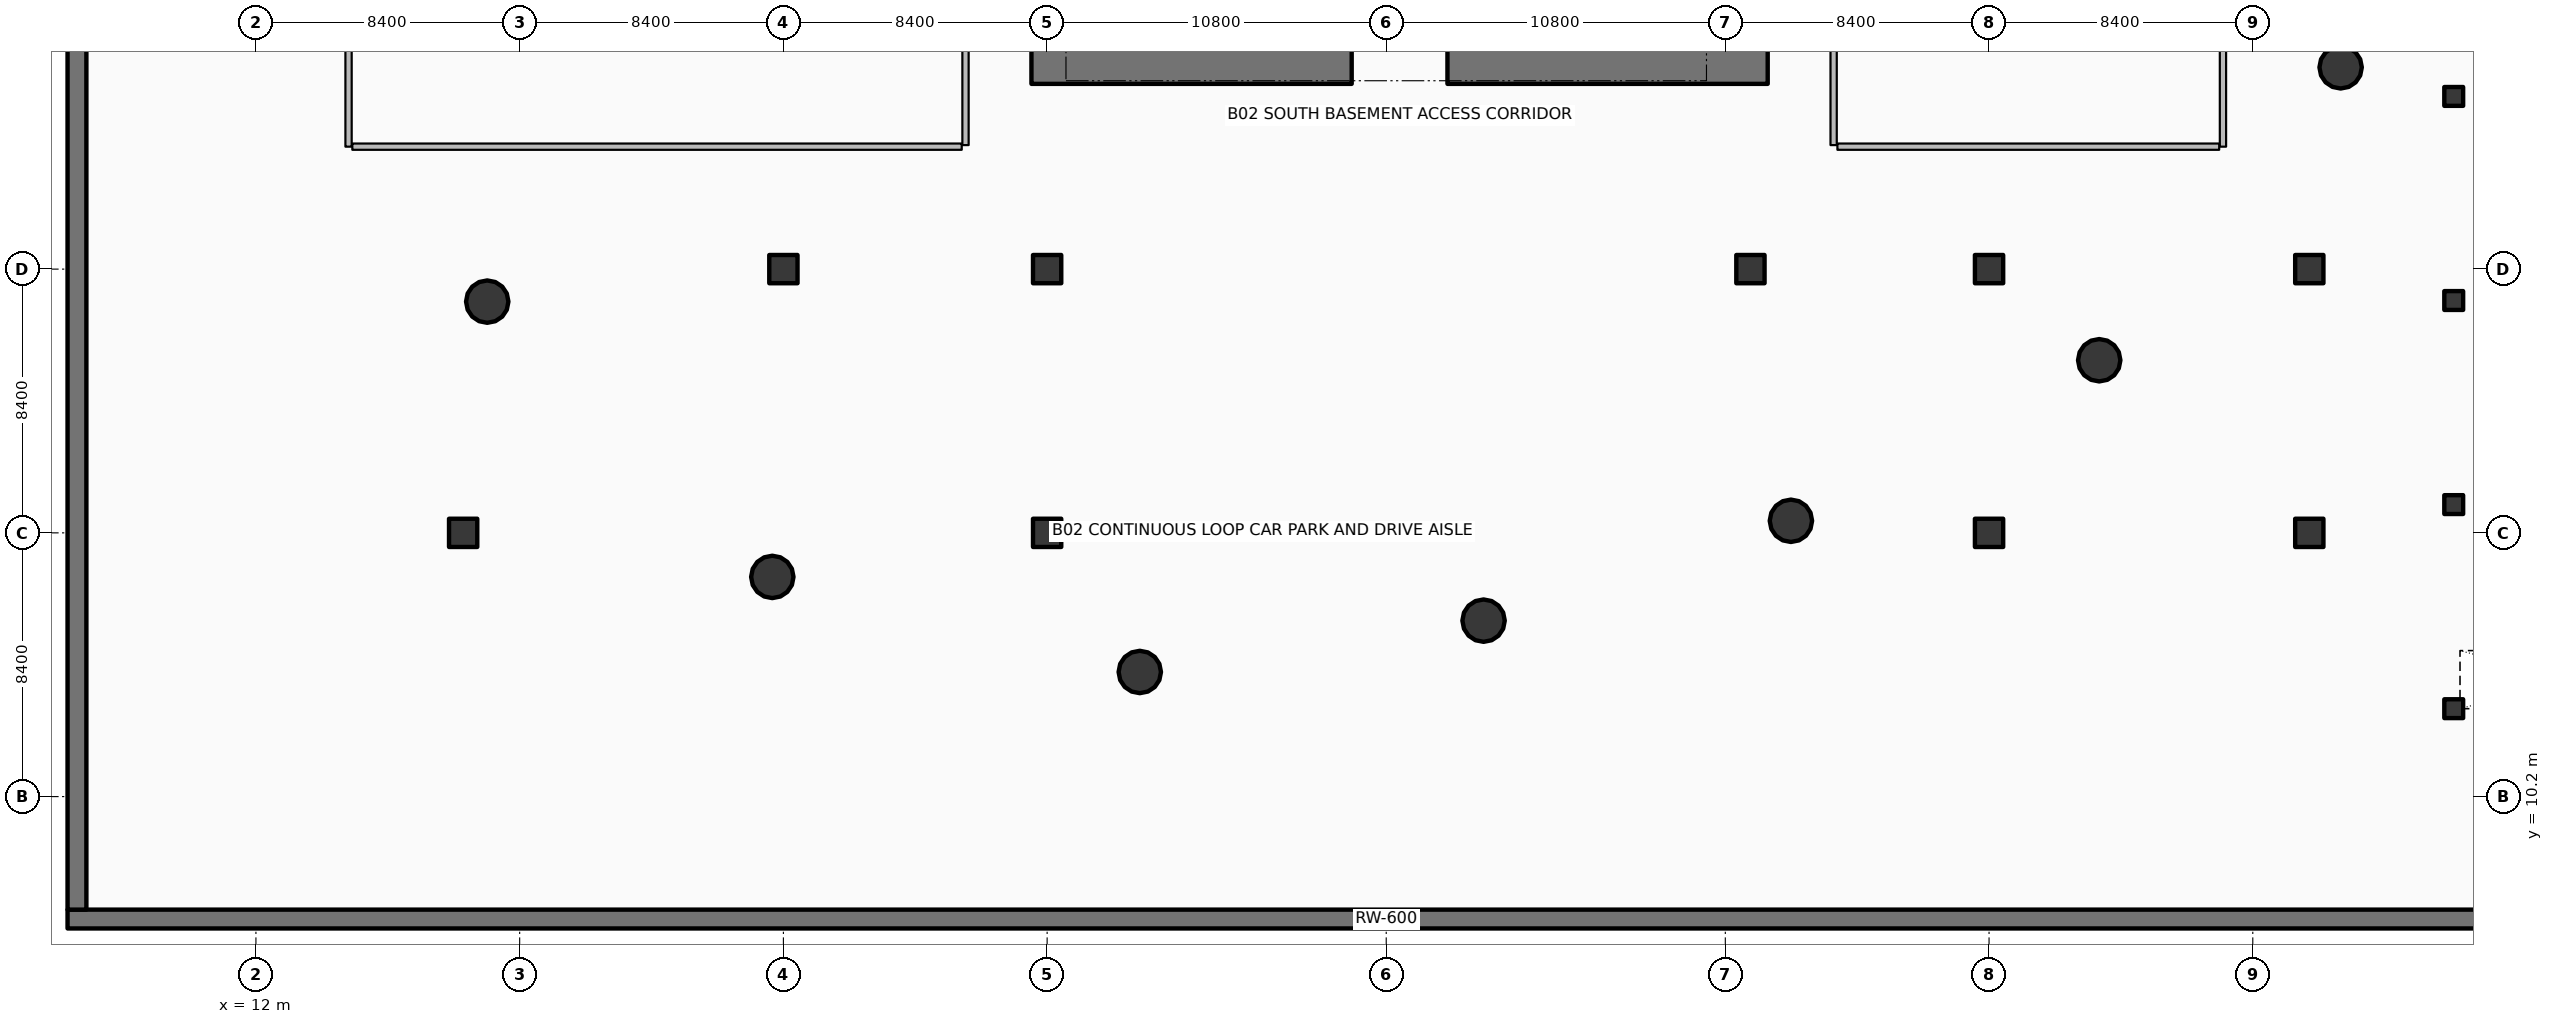
"""IFC4 building model, lengths in metres.
Left out: names, types, materials, properties, quantities, classifications, styles, units other than length and angle.
Written with IfcOpenShell. Run it as: python <this file> out.ifc"""

import sys

from ifc_helpers import new_model, si_unit, direction, frame, frame_2d, origin, origin_2d, place, context, subcontext, project, spatial, rectangle, circle, extrude, element, save


model = new_model("IFC4")
c1 = context("Model", 3, precision=1e-05, world=origin(), true_north=direction((0.0, 1.0)))
c2 = subcontext(c1, "Body", "Model", "MODEL_VIEW")
j1 = project(units=[si_unit("LENGTHUNIT", "METRE"), si_unit("PLANEANGLEUNIT", "RADIAN")], contexts=[c1])
p1 = place(None, origin())
s1 = spatial("IfcSite", under=j1, at=p1, CompositionType="ELEMENT")
p2 = place(p1, origin())
s2 = spatial("IfcBuilding", under=s1, at=p2, CompositionType="ELEMENT")
p3 = place(p2, frame((0.0, 0.0, -7.6)))
s3 = spatial("IfcBuildingStorey", under=s2, at=p3, CompositionType="ELEMENT", Elevation=-7.6)
p4 = place(p3, frame((6.0, 6.3, 0.0), z_axis=(0.0, 0.0, 1.0), x_axis=(1.0, 0.0, 0.0)))
e1 = element("IfcWall", 1, at=p4, inside=s3, PredefinedType="USERDEFINED", context=c2, shape_type="SweptSolid", body=[
    extrude(rectangle(XDim=84.0, YDim=0.6, at=frame_2d((42.0, 0.0))), origin(), (0.0, 0.0, 1.0), 3.8),
])
p5 = place(p3, frame((6.3, 6.6, 0.0), z_axis=(0.0, 0.0, 1.0), x_axis=(0.0, 1.0, 0.0)))
e2 = element("IfcWall", 2, at=p5, inside=s3, PredefinedType="USERDEFINED", context=c2, shape_type="SweptSolid", body=[
    extrude(rectangle(XDim=70.8, YDim=0.6, at=frame_2d((35.4, 0.0))), origin(), (0.0, 0.0, 1.0), 3.8),
])
for number, where, z_axis, x_axis in (
    (3, (18.6, 18.6, 0.0), (0.0, 0.0, 1.0), (1.0, 0.0, 0.0)),
    (4, (28.8, 27.0, 0.0), (0.0, 0.0, 1.0), (1.0, 0.0, 0.0)),
    (5, (37.2, 18.6, 0.0), (0.0, 0.0, 1.0), (1.0, 0.0, 0.0)),
    (6, (37.2, 27.0, 0.0), (0.0, 0.0, 1.0), (1.0, 0.0, 0.0)),
    (7, (59.6, 27.0, 0.0), (0.0, 0.0, 1.0), (1.0, 0.0, 0.0)),
    (8, (67.2, 18.6, 0.0), (0.0, 0.0, 1.0), (1.0, 0.0, 0.0)),
    (9, (67.2, 27.0, 0.0), (0.0, 0.0, 1.0), (1.0, 0.0, 0.0)),
    (10, (77.4, 18.6, 0.0), (0.0, 0.0, 1.0), (1.0, 0.0, 0.0)),
    (11, (77.4, 27.0, 0.0), (0.0, 0.0, 1.0), (1.0, 0.0, 0.0)),
):
    element("IfcColumn", number, at=place(p3, frame(where, z_axis=z_axis, x_axis=x_axis)), inside=s3, PredefinedType="COLUMN", context=c2, shape_type="SweptSolid", body=[
        extrude(rectangle(XDim=0.9, YDim=0.9, at=origin_2d()), origin(), (0.0, 0.0, 1.0), 3.52),
    ])
for number, where, z_axis, x_axis in (
    (12, (82.0, 13.0, 0.0), (0.0, 0.0, 1.0), (1.0, 0.0, 0.0)),
    (13, (82.0, 19.5, 0.0), (0.0, 0.0, 1.0), (1.0, 0.0, 0.0)),
    (14, (82.0, 26.0, 0.0), (0.0, 0.0, 1.0), (1.0, 0.0, 0.0)),
    (15, (82.0, 32.5, 0.0), (0.0, 0.0, 1.0), (1.0, 0.0, 0.0)),
):
    element("IfcColumn", number, at=place(p3, frame(where, z_axis=z_axis, x_axis=x_axis)), inside=s3, PredefinedType="COLUMN", context=c2, shape_type="SweptSolid", body=[
        extrude(rectangle(XDim=0.6, YDim=0.6, at=origin_2d()), origin(), (0.0, 0.0, 1.0), 3.52),
    ])
for number, where, z_axis, x_axis in (
    (16, (36.7, 33.45, 0.0), (0.0, 0.0, 1.0), (1.0, 0.0, 0.0)),
    (17, (49.95, 33.45, 0.0), (0.0, 0.0, 1.0), (1.0, 0.0, 0.0)),
):
    element("IfcWall", number, at=place(p3, frame(where, z_axis=z_axis, x_axis=x_axis)), inside=s3, PredefinedType="SHEAR", context=c2, shape_type="SweptSolid", body=[
        extrude(rectangle(XDim=10.2, YDim=1.1, at=frame_2d((5.1, 0.0))), origin(), (0.0, 0.0, 1.0), 3.8),
    ])
for number, where, z_axis, x_axis in (
    (18, (19.367, 25.965, 0.0), (0.0, 0.0, 1.0), (1.0, 0.0, 0.0)),
    (19, (28.447, 17.197, 0.0), (0.0, 0.0, 1.0), (1.0, 0.0, 0.0)),
    (20, (40.151, 14.169, 0.0), (0.0, 0.0, 1.0), (1.0, 0.0, 0.0)),
    (21, (51.101, 15.804, 0.0), (0.0, 0.0, 1.0), (1.0, 0.0, 0.0)),
    (22, (60.889, 18.984, 0.0), (0.0, 0.0, 1.0), (1.0, 0.0, 0.0)),
    (23, (70.709, 24.098, 0.0), (0.0, 0.0, 1.0), (1.0, 0.0, 0.0)),
    (24, (78.398, 33.427, 0.0), (0.0, 0.0, 1.0), (1.0, 0.0, 0.0)),
):
    element("IfcColumn", number, at=place(p3, frame(where, z_axis=z_axis, x_axis=x_axis)), inside=s3, PredefinedType="COLUMN", context=c2, shape_type="SweptSolid", body=[
        extrude(circle(Radius=0.675, at=origin_2d()), origin(), (0.0, 0.0, 1.0), 3.52),
    ])
p6 = place(p3, frame((14.95, 30.9, 0.0), z_axis=(0.0, 0.0, 1.0), x_axis=(0.0, 1.0, 0.0)))
e25 = element("IfcWall", 25, at=p6, inside=s3, PredefinedType="PARTITIONING", context=c2, shape_type="SweptSolid", body=[
    extrude(rectangle(XDim=22.2, YDim=0.2, at=frame_2d((11.1, 0.0))), origin(), (0.0, 0.0, 1.0), 2.96),
])
p7 = place(p3, frame((15.07, 30.9, 0.0), z_axis=(0.0, 0.0, 1.0), x_axis=(1.0, 0.0, 0.0)))
e26 = element("IfcWall", 26, at=p7, inside=s3, PredefinedType="PARTITIONING", context=c2, shape_type="SweptSolid", body=[
    extrude(rectangle(XDim=19.41, YDim=0.2, at=frame_2d((9.705, 0.0))), origin(), (0.0, 0.0, 1.0), 2.811),
])
p8 = place(p3, frame((34.6, 30.95, 0.0), z_axis=(0.0, 0.0, 1.0), x_axis=(0.0, 1.0, 0.0)))
e27 = element("IfcWall", 27, at=p8, inside=s3, PredefinedType="PARTITIONING", context=c2, shape_type="SweptSolid", body=[
    extrude(rectangle(XDim=22.1, YDim=0.2, at=frame_2d((11.05, 0.0))), origin(), (0.0, 0.0, 1.0), 2.811),
])
p9 = place(p8, frame((10.525, 0.0, 0.0)))
e28 = element("IfcOpeningElement", 28, at=p9, cuts=e27, PredefinedType="OPENING", context=c2, shape_type="SweptSolid", body=[
    extrude(rectangle(XDim=1.05, YDim=2.1, at=frame_2d((0.525, 1.05))), frame((0.0, 0.11, 0.0), z_axis=(0.0, -1.0, 0.0), x_axis=(1.0, 0.0, 0.0)), (0.0, 0.0, 1.0), 0.22),
])
p10 = place(p3, frame((74.65, 30.9, 0.0), z_axis=(0.0, 0.0, 1.0), x_axis=(0.0, 1.0, 0.0)))
e29 = element("IfcWall", 29, at=p10, inside=s3, PredefinedType="PARTITIONING", context=c2, shape_type="SweptSolid", body=[
    extrude(rectangle(XDim=22.2, YDim=0.2, at=frame_2d((11.1, 0.0))), origin(), (0.0, 0.0, 1.0), 2.811),
])
p11 = place(p3, frame((62.37, 30.9, 0.0), z_axis=(0.0, 0.0, 1.0), x_axis=(1.0, 0.0, 0.0)))
e30 = element("IfcWall", 30, at=p11, inside=s3, PredefinedType="PARTITIONING", context=c2, shape_type="SweptSolid", body=[
    extrude(rectangle(XDim=12.16, YDim=0.2, at=frame_2d((6.08, 0.0))), origin(), (0.0, 0.0, 1.0), 2.811),
])
p12 = place(p3, frame((62.25, 30.95, 0.0), z_axis=(0.0, 0.0, 1.0), x_axis=(0.0, 1.0, 0.0)))
e31 = element("IfcWall", 31, at=p12, inside=s3, PredefinedType="PARTITIONING", context=c2, shape_type="SweptSolid", body=[
    extrude(rectangle(XDim=22.1, YDim=0.2, at=frame_2d((11.05, 0.0))), origin(), (0.0, 0.0, 1.0), 2.811),
])
p13 = place(p12, frame((10.525, 0.0, 0.0)))
e32 = element("IfcOpeningElement", 32, at=p13, cuts=e31, PredefinedType="OPENING", context=c2, shape_type="SweptSolid", body=[
    extrude(rectangle(XDim=1.05, YDim=2.1, at=frame_2d((0.525, 1.05))), frame((0.0, 0.11, 0.0), z_axis=(0.0, -1.0, 0.0), x_axis=(1.0, 0.0, 0.0)), (0.0, 0.0, 1.0), 0.22),
])
save(model, sys.argv[1])
